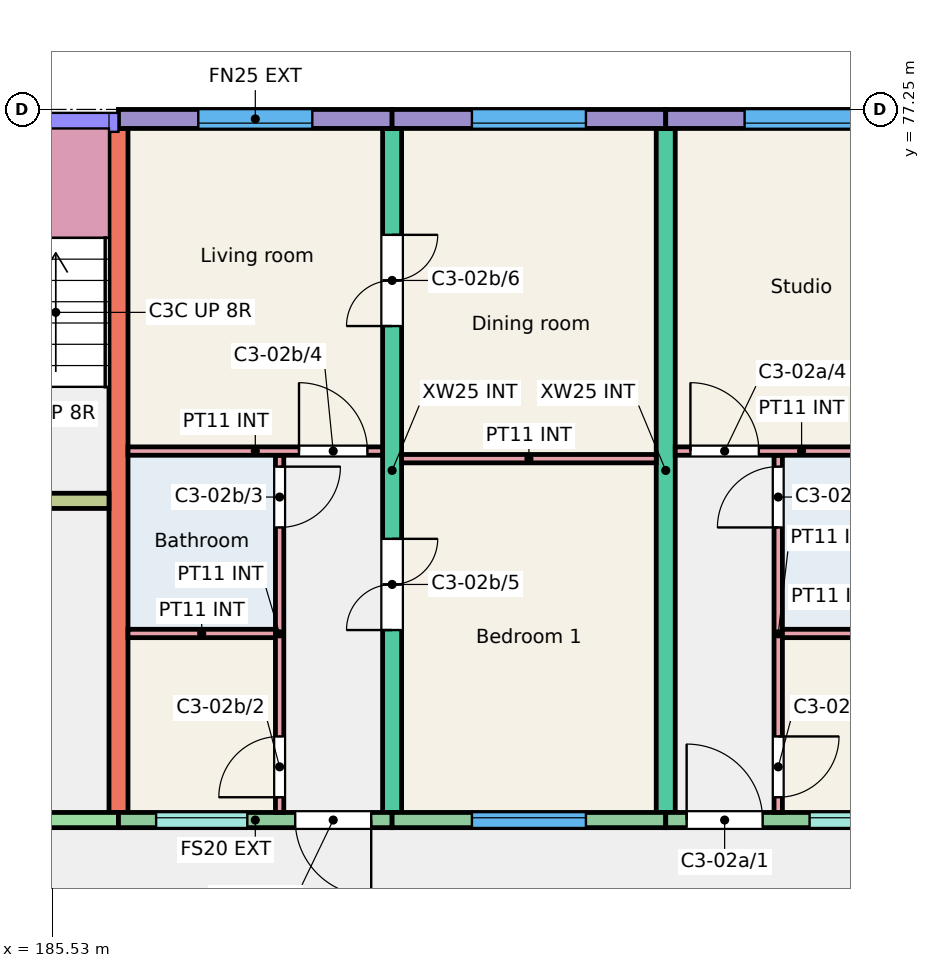
"""IFC4 building model, lengths in metres.
Left out: names, types, materials, properties, quantities, classifications, styles, units other than length and angle.
Written with IfcOpenShell. Run it as: python <this file> out.ifc"""

import sys

from ifc_helpers import new_model, si_unit, direction, frame, frame_2d, origin, place, context, subcontext, project, spatial, rectangle, extrude, element, fill, save


model = new_model("IFC4")
c1 = context("Model", 3, precision=1e-05, world=origin(), true_north=direction((0.0, 1.0)))
c2 = subcontext(c1, "Body", "Model", "MODEL_VIEW")
j1 = project(units=[si_unit("LENGTHUNIT", "METRE"), si_unit("PLANEANGLEUNIT", "RADIAN")], contexts=[c1])
p1 = place(None, origin())
s1 = spatial("IfcSite", under=j1, at=p1, CompositionType="ELEMENT")
p2 = place(p1, origin())
s2 = spatial("IfcBuilding", under=s1, at=p2, CompositionType="ELEMENT")
p3 = place(p2, frame((0.0, 0.0, 6.0)))
s3 = spatial("IfcBuildingStorey", under=s2, at=p3, CompositionType="ELEMENT", Elevation=6.0)
p4 = place(p3, frame((186.4, 68.0, 0.0), z_axis=(0.0, 0.0, 1.0), x_axis=(0.0, 1.0, 0.0)))
e1 = element("IfcWall", 1, at=p4, inside=s3, PredefinedType="SHEAR", context=c2, shape_type="SweptSolid", body=[
    extrude(rectangle(XDim=9.0, YDim=0.25, at=frame_2d((4.5, 0.0))), origin(), (0.0, 0.0, 1.0), 3.0),
])
p5 = place(p3, frame((190.0, 68.0, 0.0), z_axis=(0.0, 0.0, 1.0), x_axis=(0.0, 1.0, 0.0)))
e2 = element("IfcWall", 2, at=p5, inside=s3, PredefinedType="SHEAR", context=c2, shape_type="SweptSolid", body=[
    extrude(rectangle(XDim=9.0, YDim=0.25, at=frame_2d((4.5, 0.0))), origin(), (0.0, 0.0, 1.0), 3.0),
])
p6 = place(p5, frame((2.4, 0.0, 0.0)))
e3 = element("IfcOpeningElement", 3, at=p6, cuts=e2, PredefinedType="OPENING", context=c2, shape_type="SweptSolid", body=[
    extrude(rectangle(XDim=1.2, YDim=2.1, at=frame_2d((0.6, 1.05))), frame((0.0, 0.135, 0.0), z_axis=(0.0, -1.0, 0.0), x_axis=(1.0, 0.0, 0.0)), (0.0, 0.0, 1.0), 0.27),
])
p7 = place(p5, frame((6.4, 0.0, 0.0)))
e4 = element("IfcOpeningElement", 4, at=p7, cuts=e2, PredefinedType="OPENING", context=c2, shape_type="SweptSolid", body=[
    extrude(rectangle(XDim=1.2, YDim=2.1, at=frame_2d((0.6, 1.05))), frame((0.0, 0.135, 0.0), z_axis=(0.0, -1.0, 0.0), x_axis=(1.0, 0.0, 0.0)), (0.0, 0.0, 1.0), 0.27),
])
p8 = place(p3, frame((193.6, 68.0, 0.0), z_axis=(0.0, 0.0, 1.0), x_axis=(0.0, 1.0, 0.0)))
e5 = element("IfcWall", 5, at=p8, inside=s3, PredefinedType="SHEAR", context=c2, shape_type="SweptSolid", body=[
    extrude(rectangle(XDim=9.0, YDim=0.25, at=frame_2d((4.5, 0.0))), origin(), (0.0, 0.0, 1.0), 3.0),
])
p9 = place(p3, frame((180.55, 67.9, 0.0), z_axis=(0.0, 0.0, 1.0), x_axis=(1.0, 0.0, 0.0)))
e6 = element("IfcWall", 6, at=p9, inside=s3, PredefinedType="SHEAR", context=c2, shape_type="SweptSolid", body=[
    extrude(rectangle(XDim=5.85, YDim=0.2, at=frame_2d((2.925, 0.0))), origin(), (0.0, 0.0, 1.0), 3.0),
])
p10 = place(p9, frame((2.312, 0.0, 0.0)))
e7 = element("IfcOpeningElement", 7, at=p10, cuts=e6, PredefinedType="OPENING", context=c2, shape_type="SweptSolid", body=[
    extrude(rectangle(XDim=1.1, YDim=2.1, at=frame_2d((0.55, 1.05))), frame((0.0, 0.11, 0.0), z_axis=(0.0, -1.0, 0.0), x_axis=(1.0, 0.0, 0.0)), (0.0, 0.0, 1.0), 0.22),
])
p11 = place(p3, frame((180.55, 72.1, 0.0), z_axis=(0.0, 0.0, 1.0), x_axis=(1.0, 0.0, 0.0)))
e8 = element("IfcWall", 8, at=p11, inside=s3, PredefinedType="SHEAR", context=c2, shape_type="SweptSolid", body=[
    extrude(rectangle(XDim=5.725, YDim=0.2, at=frame_2d((2.862, 0.0))), origin(), (0.0, 0.0, 1.0), 3.0),
])
p12 = place(p11, frame((3.775, 0.0, 0.0)))
e9 = element("IfcOpeningElement", 9, at=p12, cuts=e8, PredefinedType="OPENING", context=c2, shape_type="SweptSolid", body=[
    extrude(rectangle(XDim=1.0, YDim=2.1, at=frame_2d((0.5, 1.05))), frame((0.0, 0.11, 0.0), z_axis=(0.0, -1.0, 0.0), x_axis=(1.0, 0.0, 0.0)), (0.0, 0.0, 1.0), 0.22),
])
p13 = place(p11, frame((0.762, 0.0, 0.0)))
e10 = element("IfcOpeningElement", 10, at=p13, cuts=e8, PredefinedType="OPENING", context=c2, shape_type="SweptSolid", body=[
    extrude(rectangle(XDim=1.1, YDim=2.1, at=frame_2d((0.55, 1.05))), frame((0.0, 0.11, 0.0), z_axis=(0.0, -1.0, 0.0), x_axis=(1.0, 0.0, 0.0)), (0.0, 0.0, 1.0), 0.22),
])
p14 = place(p3, frame((186.4, 77.125, 0.0), z_axis=(0.0, 0.0, 1.0), x_axis=(1.0, 0.0, 0.0)))
e11 = element("IfcWall", 11, at=p14, inside=s3, PredefinedType="SOLIDWALL", context=c2, shape_type="SweptSolid", body=[
    extrude(rectangle(XDim=3.6, YDim=0.25, at=frame_2d((1.8, 0.0))), origin(), (0.0, 0.0, 1.0), 3.0),
])
p15 = place(p14, frame((1.05, 0.0, 0.9)))
e12 = element("IfcOpeningElement", 12, at=p15, cuts=e11, PredefinedType="OPENING", context=c2, shape_type="SweptSolid", body=[
    extrude(rectangle(XDim=1.5, YDim=1.5, at=frame_2d((0.75, 0.75))), frame((0.0, 0.135, 0.0), z_axis=(0.0, -1.0, 0.0), x_axis=(1.0, 0.0, 0.0)), (0.0, 0.0, 1.0), 0.27),
])
p16 = place(p3, frame((186.4, 67.9, 0.0), z_axis=(0.0, 0.0, 1.0), x_axis=(1.0, 0.0, 0.0)))
e13 = element("IfcWall", 13, at=p16, inside=s3, PredefinedType="SOLIDWALL", context=c2, shape_type="SweptSolid", body=[
    extrude(rectangle(XDim=3.6, YDim=0.2, at=frame_2d((1.8, 0.0))), origin(), (0.0, 0.0, 1.0), 3.0),
])
p17 = place(p16, frame((0.495, 0.0, 1.1)))
e14 = element("IfcOpeningElement", 14, at=p17, cuts=e13, PredefinedType="OPENING", context=c2, shape_type="SweptSolid", body=[
    extrude(rectangle(XDim=1.2, YDim=1.3, at=frame_2d((0.6, 0.65))), frame((0.0, 0.11, 0.0), z_axis=(0.0, -1.0, 0.0), x_axis=(1.0, 0.0, 0.0)), (0.0, 0.0, 1.0), 0.22),
])
p18 = place(p16, frame((2.325, 0.0, 0.0)))
e15 = element("IfcOpeningElement", 15, at=p18, cuts=e13, PredefinedType="OPENING", context=c2, shape_type="SweptSolid", body=[
    extrude(rectangle(XDim=1.0, YDim=2.1, at=frame_2d((0.5, 1.05))), frame((0.0, 0.11, 0.0), z_axis=(0.0, -1.0, 0.0), x_axis=(1.0, 0.0, 0.0)), (0.0, 0.0, 1.0), 0.22),
])
p19 = place(p3, frame((190.0, 77.125, 0.0), z_axis=(0.0, 0.0, 1.0), x_axis=(1.0, 0.0, 0.0)))
e16 = element("IfcWall", 16, at=p19, inside=s3, PredefinedType="SOLIDWALL", context=c2, shape_type="SweptSolid", body=[
    extrude(rectangle(XDim=3.6, YDim=0.25, at=frame_2d((1.8, 0.0))), origin(), (0.0, 0.0, 1.0), 3.0),
])
p20 = place(p19, frame((1.05, 0.0, 0.9)))
e17 = element("IfcOpeningElement", 17, at=p20, cuts=e16, PredefinedType="OPENING", context=c2, shape_type="SweptSolid", body=[
    extrude(rectangle(XDim=1.5, YDim=1.5, at=frame_2d((0.75, 0.75))), frame((0.0, 0.135, 0.0), z_axis=(0.0, -1.0, 0.0), x_axis=(1.0, 0.0, 0.0)), (0.0, 0.0, 1.0), 0.27),
])
p21 = place(p3, frame((190.0, 67.9, 0.0), z_axis=(0.0, 0.0, 1.0), x_axis=(1.0, 0.0, 0.0)))
e18 = element("IfcWall", 18, at=p21, inside=s3, PredefinedType="SOLIDWALL", context=c2, shape_type="SweptSolid", body=[
    extrude(rectangle(XDim=3.6, YDim=0.2, at=frame_2d((1.8, 0.0))), origin(), (0.0, 0.0, 1.0), 3.0),
])
p22 = place(p21, frame((1.05, 0.0, 0.9)))
e19 = element("IfcOpeningElement", 19, at=p22, cuts=e18, PredefinedType="OPENING", context=c2, shape_type="SweptSolid", body=[
    extrude(rectangle(XDim=1.5, YDim=1.5, at=frame_2d((0.75, 0.75))), frame((0.0, 0.11, 0.0), z_axis=(0.0, -1.0, 0.0), x_axis=(1.0, 0.0, 0.0)), (0.0, 0.0, 1.0), 0.22),
])
p23 = place(p3, frame((193.6, 77.125, 0.0), z_axis=(0.0, 0.0, 1.0), x_axis=(1.0, 0.0, 0.0)))
e20 = element("IfcWall", 20, at=p23, inside=s3, PredefinedType="SOLIDWALL", context=c2, shape_type="SweptSolid", body=[
    extrude(rectangle(XDim=3.6, YDim=0.25, at=frame_2d((1.8, 0.0))), origin(), (0.0, 0.0, 1.0), 3.0),
])
p24 = place(p23, frame((1.038, 0.0, 0.9)))
e21 = element("IfcOpeningElement", 21, at=p24, cuts=e20, PredefinedType="OPENING", context=c2, shape_type="SweptSolid", body=[
    extrude(rectangle(XDim=1.5, YDim=1.5, at=frame_2d((0.75, 0.75))), frame((0.0, 0.135, 0.0), z_axis=(0.0, -1.0, 0.0), x_axis=(1.0, 0.0, 0.0)), (0.0, 0.0, 1.0), 0.27),
])
p25 = place(p3, frame((193.6, 67.9, 0.0), z_axis=(0.0, 0.0, 1.0), x_axis=(1.0, 0.0, 0.0)))
e22 = element("IfcWall", 22, at=p25, inside=s3, PredefinedType="SOLIDWALL", context=c2, shape_type="SweptSolid", body=[
    extrude(rectangle(XDim=3.45, YDim=0.2, at=frame_2d((1.725, 0.0))), origin(), (0.0, 0.0, 1.0), 3.0),
])
p26 = place(p25, frame((1.893, 0.0, 1.1)))
e23 = element("IfcOpeningElement", 23, at=p26, cuts=e22, PredefinedType="OPENING", context=c2, shape_type="SweptSolid", body=[
    extrude(rectangle(XDim=1.2, YDim=1.3, at=frame_2d((0.6, 0.65))), frame((0.0, 0.11, 0.0), z_axis=(0.0, -1.0, 0.0), x_axis=(1.0, 0.0, 0.0)), (0.0, 0.0, 1.0), 0.22),
])
p27 = place(p25, frame((0.275, 0.0, 0.0)))
e24 = element("IfcOpeningElement", 24, at=p27, cuts=e22, PredefinedType="OPENING", context=c2, shape_type="SweptSolid", body=[
    extrude(rectangle(XDim=1.0, YDim=2.1, at=frame_2d((0.5, 1.05))), frame((0.0, 0.11, 0.0), z_axis=(0.0, -1.0, 0.0), x_axis=(1.0, 0.0, 0.0)), (0.0, 0.0, 1.0), 0.22),
])
p28 = place(p3, frame((195.08, 68.0, 0.0), z_axis=(0.0, 0.0, 1.0), x_axis=(0.0, 1.0, 0.0)))
e25 = element("IfcWall", 25, at=p28, inside=s3, PredefinedType="PARTITIONING", context=c2, shape_type="SweptSolid", body=[
    extrude(rectangle(XDim=4.7, YDim=0.11, at=frame_2d((2.35, 0.0))), origin(), (0.0, 0.0, 1.0), 2.8),
])
p29 = place(p28, frame((0.2, 0.0, 0.0)))
e26 = element("IfcOpeningElement", 26, at=p29, cuts=e25, PredefinedType="OPENING", context=c2, shape_type="SweptSolid", body=[
    extrude(rectangle(XDim=0.8, YDim=2.1, at=frame_2d((0.4, 1.05))), frame((0.0, 0.065, 0.0), z_axis=(0.0, -1.0, 0.0), x_axis=(1.0, 0.0, 0.0)), (0.0, 0.0, 1.0), 0.13),
])
p30 = place(p28, frame((3.75, 0.0, 0.0)))
e27 = element("IfcOpeningElement", 27, at=p30, cuts=e25, PredefinedType="OPENING", context=c2, shape_type="SweptSolid", body=[
    extrude(rectangle(XDim=0.8, YDim=2.1, at=frame_2d((0.4, 1.05))), frame((0.0, 0.065, 0.0), z_axis=(0.0, -1.0, 0.0), x_axis=(1.0, 0.0, 0.0)), (0.0, 0.0, 1.0), 0.13),
])
p31 = place(p3, frame((195.135, 70.355, 0.0), z_axis=(0.0, 0.0, 1.0), x_axis=(1.0, 0.0, 0.0)))
e28 = element("IfcWall", 28, at=p31, inside=s3, PredefinedType="PARTITIONING", context=c2, shape_type="SweptSolid", body=[
    extrude(rectangle(XDim=1.915, YDim=0.11, at=frame_2d((0.958, 0.0))), origin(), (0.0, 0.0, 1.0), 2.8),
])
p32 = place(p3, frame((193.725, 72.755, 0.0), z_axis=(0.0, 0.0, 1.0), x_axis=(1.0, 0.0, 0.0)))
e29 = element("IfcWall", 29, at=p32, inside=s3, PredefinedType="PARTITIONING", context=c2, shape_type="SweptSolid", body=[
    extrude(rectangle(XDim=3.325, YDim=0.11, at=frame_2d((1.663, 0.0))), origin(), (0.0, 0.0, 1.0), 2.8),
])
p33 = place(p32, frame((0.2, 0.0, 0.0)))
e30 = element("IfcOpeningElement", 30, at=p33, cuts=e29, PredefinedType="OPENING", context=c2, shape_type="SweptSolid", body=[
    extrude(rectangle(XDim=0.9, YDim=2.1, at=frame_2d((0.45, 1.05))), frame((0.0, 0.065, 0.0), z_axis=(0.0, -1.0, 0.0), x_axis=(1.0, 0.0, 0.0)), (0.0, 0.0, 1.0), 0.13),
])
p34 = place(p3, frame((186.525, 70.355, 0.0), z_axis=(0.0, 0.0, 1.0), x_axis=(1.0, 0.0, 0.0)))
e31 = element("IfcWall", 31, at=p34, inside=s3, PredefinedType="PARTITIONING", context=c2, shape_type="SweptSolid", body=[
    extrude(rectangle(XDim=1.94, YDim=0.11, at=frame_2d((0.97, 0.0))), origin(), (0.0, 0.0, 1.0), 2.8),
])
p35 = place(p3, frame((188.52, 68.0, 0.0), z_axis=(0.0, 0.0, 1.0), x_axis=(0.0, 1.0, 0.0)))
e32 = element("IfcWall", 32, at=p35, inside=s3, PredefinedType="PARTITIONING", context=c2, shape_type="SweptSolid", body=[
    extrude(rectangle(XDim=4.7, YDim=0.11, at=frame_2d((2.35, 0.0))), origin(), (0.0, 0.0, 1.0), 2.8),
])
p36 = place(p35, frame((0.2, 0.0, 0.0)))
e33 = element("IfcOpeningElement", 33, at=p36, cuts=e32, PredefinedType="OPENING", context=c2, shape_type="SweptSolid", body=[
    extrude(rectangle(XDim=0.8, YDim=2.1, at=frame_2d((0.4, 1.05))), frame((0.0, 0.065, 0.0), z_axis=(0.0, -1.0, 0.0), x_axis=(1.0, 0.0, 0.0)), (0.0, 0.0, 1.0), 0.13),
])
p37 = place(p35, frame((3.75, 0.0, 0.0)))
e34 = element("IfcOpeningElement", 34, at=p37, cuts=e32, PredefinedType="OPENING", context=c2, shape_type="SweptSolid", body=[
    extrude(rectangle(XDim=0.8, YDim=2.1, at=frame_2d((0.4, 1.05))), frame((0.0, 0.065, 0.0), z_axis=(0.0, -1.0, 0.0), x_axis=(1.0, 0.0, 0.0)), (0.0, 0.0, 1.0), 0.13),
])
p38 = place(p3, frame((186.525, 72.755, 0.0), z_axis=(0.0, 0.0, 1.0), x_axis=(1.0, 0.0, 0.0)))
e35 = element("IfcWall", 35, at=p38, inside=s3, PredefinedType="PARTITIONING", context=c2, shape_type="SweptSolid", body=[
    extrude(rectangle(XDim=3.35, YDim=0.11, at=frame_2d((1.675, 0.0))), origin(), (0.0, 0.0, 1.0), 2.8),
])
p39 = place(p38, frame((2.25, 0.0, 0.0)))
e36 = element("IfcOpeningElement", 36, at=p39, cuts=e35, PredefinedType="OPENING", context=c2, shape_type="SweptSolid", body=[
    extrude(rectangle(XDim=0.9, YDim=2.1, at=frame_2d((0.45, 1.05))), frame((0.0, 0.065, 0.0), z_axis=(0.0, -1.0, 0.0), x_axis=(1.0, 0.0, 0.0)), (0.0, 0.0, 1.0), 0.13),
])
p40 = place(p3, frame((190.125, 72.655, 0.0), z_axis=(0.0, 0.0, 1.0), x_axis=(1.0, 0.0, 0.0)))
e37 = element("IfcWall", 37, at=p40, inside=s3, PredefinedType="PARTITIONING", context=c2, shape_type="SweptSolid", body=[
    extrude(rectangle(XDim=3.35, YDim=0.11, at=frame_2d((1.675, 0.0))), origin(), (0.0, 0.0, 1.0), 2.8),
])
p41 = place(p26, origin())
e38 = element("IfcWindow", 38, at=p41, inside=s3, PartitioningType="SINGLE_PANEL", PredefinedType="WINDOW", context=c2, shape_type="SweptSolid", body=[
    extrude(rectangle(XDim=1.2, YDim=1.3, at=frame_2d((0.6, 0.65))), frame((0.0, 0.06, 0.0), z_axis=(0.0, -1.0, 0.0), x_axis=(1.0, 0.0, 0.0)), (0.0, 0.0, 1.0), 0.06),
])
fill(e23, e38)
p42 = place(p24, origin())
e39 = element("IfcWindow", 39, at=p42, inside=s3, PartitioningType="SINGLE_PANEL", PredefinedType="WINDOW", context=c2, shape_type="SweptSolid", body=[
    extrude(rectangle(XDim=1.5, YDim=1.5, at=frame_2d((0.75, 0.75))), frame((0.0, -0.025, 0.0), z_axis=(0.0, -1.0, 0.0), x_axis=(1.0, 0.0, 0.0)), (0.0, 0.0, 1.0), 0.06),
])
fill(e21, e39)
p43 = place(p22, origin())
e40 = element("IfcWindow", 40, at=p43, inside=s3, PartitioningType="SINGLE_PANEL", PredefinedType="WINDOW", context=c2, shape_type="SweptSolid", body=[
    extrude(rectangle(XDim=1.5, YDim=1.5, at=frame_2d((0.75, 0.75))), frame((0.0, 0.06, 0.0), z_axis=(0.0, -1.0, 0.0), x_axis=(1.0, 0.0, 0.0)), (0.0, 0.0, 1.0), 0.06),
])
fill(e19, e40)
p44 = place(p20, origin())
e41 = element("IfcWindow", 41, at=p44, inside=s3, PartitioningType="SINGLE_PANEL", PredefinedType="WINDOW", context=c2, shape_type="SweptSolid", body=[
    extrude(rectangle(XDim=1.5, YDim=1.5, at=frame_2d((0.75, 0.75))), frame((0.0, -0.025, 0.0), z_axis=(0.0, -1.0, 0.0), x_axis=(1.0, 0.0, 0.0)), (0.0, 0.0, 1.0), 0.06),
])
fill(e17, e41)
p45 = place(p17, origin())
e42 = element("IfcWindow", 42, at=p45, inside=s3, PartitioningType="SINGLE_PANEL", PredefinedType="WINDOW", context=c2, shape_type="SweptSolid", body=[
    extrude(rectangle(XDim=1.2, YDim=1.3, at=frame_2d((0.6, 0.65))), frame((0.0, 0.06, 0.0), z_axis=(0.0, -1.0, 0.0), x_axis=(1.0, 0.0, 0.0)), (0.0, 0.0, 1.0), 0.06),
])
fill(e14, e42)
p46 = place(p15, origin())
e43 = element("IfcWindow", 43, at=p46, inside=s3, PartitioningType="SINGLE_PANEL", PredefinedType="WINDOW", context=c2, shape_type="SweptSolid", body=[
    extrude(rectangle(XDim=1.5, YDim=1.5, at=frame_2d((0.75, 0.75))), frame((0.0, -0.025, 0.0), z_axis=(0.0, -1.0, 0.0), x_axis=(1.0, 0.0, 0.0)), (0.0, 0.0, 1.0), 0.06),
])
fill(e12, e43)
p47 = place(p27, origin())
e44 = element("IfcDoor", 44, at=p47, inside=s3, OperationType="SINGLE_SWING_LEFT", PredefinedType="DOOR", context=c2, shape_type="SweptSolid", body=[
    extrude(rectangle(XDim=1.0, YDim=2.1, at=frame_2d((0.5, 1.05))), frame((0.0, 0.025, 0.0), z_axis=(0.0, -1.0, 0.0), x_axis=(1.0, 0.0, 0.0)), (0.0, 0.0, 1.0), 0.05),
])
fill(e24, e44)
p48 = place(p29, origin())
e45 = element("IfcDoor", 45, at=p48, inside=s3, OperationType="SINGLE_SWING_RIGHT", PredefinedType="DOOR", context=c2, shape_type="SweptSolid", body=[
    extrude(rectangle(XDim=0.8, YDim=2.1, at=frame_2d((0.4, 1.05))), frame((0.0, 0.025, 0.0), z_axis=(0.0, -1.0, 0.0), x_axis=(1.0, 0.0, 0.0)), (0.0, 0.0, 1.0), 0.05),
])
fill(e26, e45)
p49 = place(p30, origin())
e46 = element("IfcDoor", 46, at=p49, inside=s3, OperationType="SINGLE_SWING_LEFT", PredefinedType="DOOR", context=c2, shape_type="SweptSolid", body=[
    extrude(rectangle(XDim=0.8, YDim=2.1, at=frame_2d((0.4, 1.05))), frame((0.0, 0.025, 0.0), z_axis=(0.0, -1.0, 0.0), x_axis=(1.0, 0.0, 0.0)), (0.0, 0.0, 1.0), 0.05),
])
fill(e27, e46)
p50 = place(p33, origin())
e47 = element("IfcDoor", 47, at=p50, inside=s3, OperationType="SINGLE_SWING_LEFT", PredefinedType="DOOR", context=c2, shape_type="SweptSolid", body=[
    extrude(rectangle(XDim=0.9, YDim=2.1, at=frame_2d((0.45, 1.05))), frame((0.0, 0.025, 0.0), z_axis=(0.0, -1.0, 0.0), x_axis=(1.0, 0.0, 0.0)), (0.0, 0.0, 1.0), 0.05),
])
fill(e30, e47)
p51 = place(p18, origin())
e48 = element("IfcDoor", 48, at=p51, inside=s3, OperationType="SINGLE_SWING_RIGHT", PredefinedType="DOOR", context=c2, shape_type="SweptSolid", body=[
    extrude(rectangle(XDim=1.0, YDim=2.1, at=frame_2d((0.5, 1.05))), frame((0.0, 0.025, 0.0), z_axis=(0.0, -1.0, 0.0), x_axis=(1.0, 0.0, 0.0)), (0.0, 0.0, 1.0), 0.05),
])
fill(e15, e48)
p52 = place(p36, origin())
e49 = element("IfcDoor", 49, at=p52, inside=s3, OperationType="SINGLE_SWING_LEFT", PredefinedType="DOOR", context=c2, shape_type="SweptSolid", body=[
    extrude(rectangle(XDim=0.8, YDim=2.1, at=frame_2d((0.4, 1.05))), frame((0.0, 0.025, 0.0), z_axis=(0.0, -1.0, 0.0), x_axis=(1.0, 0.0, 0.0)), (0.0, 0.0, 1.0), 0.05),
])
fill(e33, e49)
p53 = place(p37, origin())
e50 = element("IfcDoor", 50, at=p53, inside=s3, OperationType="SINGLE_SWING_RIGHT", PredefinedType="DOOR", context=c2, shape_type="SweptSolid", body=[
    extrude(rectangle(XDim=0.8, YDim=2.1, at=frame_2d((0.4, 1.05))), frame((0.0, 0.025, 0.0), z_axis=(0.0, -1.0, 0.0), x_axis=(1.0, 0.0, 0.0)), (0.0, 0.0, 1.0), 0.05),
])
fill(e34, e50)
p54 = place(p39, origin())
e51 = element("IfcDoor", 51, at=p54, inside=s3, OperationType="SINGLE_SWING_LEFT", PredefinedType="DOOR", context=c2, shape_type="SweptSolid", body=[
    extrude(rectangle(XDim=0.9, YDim=2.1, at=frame_2d((0.45, 1.05))), frame((0.0, 0.025, 0.0), z_axis=(0.0, -1.0, 0.0), x_axis=(1.0, 0.0, 0.0)), (0.0, 0.0, 1.0), 0.05),
])
fill(e36, e51)
p55 = place(p6, origin())
e52 = element("IfcDoor", 52, at=p55, inside=s3, OperationType="DOUBLE_DOOR_SINGLE_SWING", PredefinedType="DOOR", context=c2, shape_type="SweptSolid", body=[
    extrude(rectangle(XDim=1.2, YDim=2.1, at=frame_2d((0.6, 1.05))), frame((0.0, 0.025, 0.0), z_axis=(0.0, -1.0, 0.0), x_axis=(1.0, 0.0, 0.0)), (0.0, 0.0, 1.0), 0.05),
])
fill(e3, e52)
p56 = place(p7, origin())
e53 = element("IfcDoor", 53, at=p56, inside=s3, OperationType="DOUBLE_DOOR_SINGLE_SWING", PredefinedType="DOOR", context=c2, shape_type="SweptSolid", body=[
    extrude(rectangle(XDim=1.2, YDim=2.1, at=frame_2d((0.6, 1.05))), frame((0.0, 0.025, 0.0), z_axis=(0.0, -1.0, 0.0), x_axis=(1.0, 0.0, 0.0)), (0.0, 0.0, 1.0), 0.05),
])
fill(e4, e53)
save(model, sys.argv[1])
